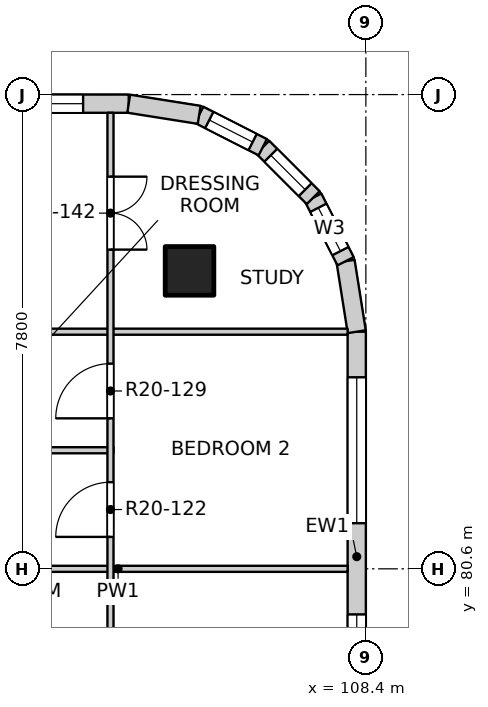
"""IFC4 building model, lengths in metres.
Left out: names, types, materials, properties, quantities, classifications, styles, units other than length and angle.
Written with IfcOpenShell. Run it as: python <this file> out.ifc"""

import sys

from ifc_helpers import new_model, si_unit, direction, frame, frame_2d, origin, origin_2d, place, context, subcontext, project, spatial, rectangle, extrude, element, fill, save


model = new_model("IFC4")
c1 = context("Model", 3, precision=1e-05, world=origin(), true_north=direction((0.0, 1.0)))
c2 = subcontext(c1, "Body", "Model", "MODEL_VIEW")
j1 = project(units=[si_unit("LENGTHUNIT", "METRE"), si_unit("PLANEANGLEUNIT", "RADIAN")], contexts=[c1])
p1 = place(None, origin())
s1 = spatial("IfcSite", under=j1, at=p1, CompositionType="ELEMENT")
p2 = place(p1, origin())
s2 = spatial("IfcBuilding", under=s1, at=p2, CompositionType="ELEMENT")
p3 = place(p2, frame((0.0, 0.0, 210.9)))
s3 = spatial("IfcBuildingStorey", under=s2, at=p3, CompositionType="ELEMENT", Elevation=210.9)
p4 = place(p3, frame((105.5, 85.5, -0.25), z_axis=(0.0, 0.0, 1.0), x_axis=(1.0, 0.0, 0.0)))
e1 = element("IfcColumn", 1, at=p4, inside=s3, PredefinedType="COLUMN", context=c2, shape_type="SweptSolid", body=[
    extrude(rectangle(XDim=0.8, YDim=0.8, at=origin_2d()), origin(), (0.0, 0.0, 1.0), 3.4),
])
p5 = place(p3, frame((108.25, 77.1, 0.0), z_axis=(0.0, 0.0, 1.0), x_axis=(0.0, 1.0, 0.0)))
e2 = element("IfcWall", 2, at=p5, inside=s3, PredefinedType="SOLIDWALL", context=c2, shape_type="SweptSolid", body=[
    extrude(rectangle(XDim=7.4, YDim=0.3, at=frame_2d((3.7, 0.0))), origin(), (0.0, 0.0, 1.0), 2.7),
])
p6 = place(p5, frame((0.35, 0.0, 0.9)))
e3 = element("IfcOpeningElement", 3, at=p6, cuts=e2, PredefinedType="OPENING", context=c2, shape_type="SweptSolid", body=[
    extrude(rectangle(XDim=2.4, YDim=1.8, at=frame_2d((1.2, 0.9))), frame((0.0, 0.16, 0.0), z_axis=(0.0, -1.0, 0.0), x_axis=(1.0, 0.0, 0.0)), (0.0, 0.0, 1.0), 0.32),
])
p7 = place(p5, frame((4.25, 0.0, 0.9)))
e4 = element("IfcOpeningElement", 4, at=p7, cuts=e2, PredefinedType="OPENING", context=c2, shape_type="SweptSolid", body=[
    extrude(rectangle(XDim=2.4, YDim=1.8, at=frame_2d((1.2, 0.9))), frame((0.0, 0.16, 0.0), z_axis=(0.0, -1.0, 0.0), x_axis=(1.0, 0.0, 0.0)), (0.0, 0.0, 1.0), 0.32),
])
p8 = place(p3, frame((97.1, 88.25, 0.0), z_axis=(0.0, 0.0, 1.0), x_axis=(1.0, 0.0, 0.0)))
e5 = element("IfcWall", 5, at=p8, inside=s3, PredefinedType="SOLIDWALL", context=c2, shape_type="SweptSolid", body=[
    extrude(rectangle(XDim=7.4, YDim=0.3, at=frame_2d((3.7, 0.0))), origin(), (0.0, 0.0, 1.0), 2.7),
])
p9 = place(p8, frame((0.35, 0.0, 0.9)))
e6 = element("IfcOpeningElement", 6, at=p9, cuts=e5, PredefinedType="OPENING", context=c2, shape_type="SweptSolid", body=[
    extrude(rectangle(XDim=2.4, YDim=1.8, at=frame_2d((1.2, 0.9))), frame((0.0, 0.16, 0.0), z_axis=(0.0, -1.0, 0.0), x_axis=(1.0, 0.0, 0.0)), (0.0, 0.0, 1.0), 0.32),
])
p10 = place(p8, frame((4.25, 0.0, 0.9)))
e7 = element("IfcOpeningElement", 7, at=p10, cuts=e5, PredefinedType="OPENING", context=c2, shape_type="SweptSolid", body=[
    extrude(rectangle(XDim=2.4, YDim=1.8, at=frame_2d((1.2, 0.9))), frame((0.0, 0.16, 0.0), z_axis=(0.0, -1.0, 0.0), x_axis=(1.0, 0.0, 0.0)), (0.0, 0.0, 1.0), 0.32),
])
p11 = place(p3, frame((108.25, 84.5, 0.0), z_axis=(0.0, 0.0, 1.0), x_axis=(-0.156496880861, 0.987678452879, 0.0)))
e8 = element("IfcWall", 8, at=p11, inside=s3, PredefinedType="SOLIDWALL", context=c2, shape_type="SweptSolid", body=[
    extrude(rectangle(XDim=1.173, YDim=0.3, at=frame_2d((0.586, 0.0))), origin(), (0.0, 0.0, 1.0), 2.7),
])
p12 = place(p3, frame((108.066, 85.659, 0.0), z_axis=(0.0, 0.0, 1.0), x_axis=(-0.454025524128, 0.890988677504, 0.0)))
e9 = element("IfcWall", 9, at=p12, inside=s3, PredefinedType="SOLIDWALL", context=c2, shape_type="SweptSolid", body=[
    extrude(rectangle(XDim=1.173, YDim=0.3, at=frame_2d((0.587, 0.0))), origin(), (0.0, 0.0, 1.0), 2.7),
])
p13 = place(p12, frame((0.187, 0.0, 0.9)))
e10 = element("IfcOpeningElement", 10, at=p13, cuts=e9, PredefinedType="OPENING", context=c2, shape_type="SweptSolid", body=[
    extrude(rectangle(XDim=0.8, YDim=1.2, at=frame_2d((0.4, 0.6))), frame((0.0, 0.16, 0.0), z_axis=(0.0, -1.0, 0.0), x_axis=(1.0, 0.0, 0.0)), (0.0, 0.0, 1.0), 0.32),
])
p14 = place(p3, frame((107.534, 86.704, 0.0), z_axis=(0.0, 0.0, 1.0), x_axis=(-0.707106781187, 0.707106781187, 0.0)))
e11 = element("IfcWall", 11, at=p14, inside=s3, PredefinedType="SOLIDWALL", context=c2, shape_type="SweptSolid", body=[
    extrude(rectangle(XDim=1.173, YDim=0.3, at=frame_2d((0.586, 0.0))), origin(), (0.0, 0.0, 1.0), 2.7),
])
p15 = place(p14, frame((0.187, 0.0, 0.9)))
e12 = element("IfcOpeningElement", 12, at=p15, cuts=e11, PredefinedType="OPENING", context=c2, shape_type="SweptSolid", body=[
    extrude(rectangle(XDim=0.8, YDim=1.2, at=frame_2d((0.4, 0.6))), frame((0.0, 0.16, 0.0), z_axis=(0.0, -1.0, 0.0), x_axis=(1.0, 0.0, 0.0)), (0.0, 0.0, 1.0), 0.32),
])
p16 = place(p3, frame((106.704, 87.534, 0.0), z_axis=(0.0, 0.0, 1.0), x_axis=(-0.890988677504, 0.454025524128, 0.0)))
e13 = element("IfcWall", 13, at=p16, inside=s3, PredefinedType="SOLIDWALL", context=c2, shape_type="SweptSolid", body=[
    extrude(rectangle(XDim=1.173, YDim=0.3, at=frame_2d((0.587, 0.0))), origin(), (0.0, 0.0, 1.0), 2.7),
])
p17 = place(p16, frame((0.187, 0.0, 0.9)))
e14 = element("IfcOpeningElement", 14, at=p17, cuts=e13, PredefinedType="OPENING", context=c2, shape_type="SweptSolid", body=[
    extrude(rectangle(XDim=0.8, YDim=1.2, at=frame_2d((0.4, 0.6))), frame((0.0, 0.16, 0.0), z_axis=(0.0, -1.0, 0.0), x_axis=(1.0, 0.0, 0.0)), (0.0, 0.0, 1.0), 0.32),
])
p18 = place(p3, frame((105.659, 88.066, 0.0), z_axis=(0.0, 0.0, 1.0), x_axis=(-0.987678452879, 0.156496880861, 0.0)))
e15 = element("IfcWall", 15, at=p18, inside=s3, PredefinedType="SOLIDWALL", context=c2, shape_type="SweptSolid", body=[
    extrude(rectangle(XDim=1.173, YDim=0.3, at=frame_2d((0.586, 0.0))), origin(), (0.0, 0.0, 1.0), 2.7),
])
p19 = place(p3, frame((100.55, 80.6, 0.0), z_axis=(0.0, 0.0, 1.0), x_axis=(1.0, 0.0, 0.0)))
e16 = element("IfcWall", 16, at=p19, inside=s3, PredefinedType="PARTITIONING", context=c2, shape_type="SweptSolid", body=[
    extrude(rectangle(XDim=7.55, YDim=0.1, at=frame_2d((3.775, 0.0))), origin(), (0.0, 0.0, 1.0), 3.15),
])
p20 = place(p3, frame((100.55, 82.55, 0.0), z_axis=(0.0, 0.0, 1.0), x_axis=(1.0, 0.0, 0.0)))
e17 = element("IfcWall", 17, at=p20, inside=s3, PredefinedType="PARTITIONING", context=c2, shape_type="SweptSolid", body=[
    extrude(rectangle(XDim=3.7, YDim=0.1, at=frame_2d((1.85, 0.0))), origin(), (0.0, 0.0, 1.0), 3.15),
])
p21 = place(p3, frame((96.6, 84.5, 0.0), z_axis=(0.0, 0.0, 1.0), x_axis=(1.0, 0.0, 0.0)))
e18 = element("IfcWall", 18, at=p21, inside=s3, PredefinedType="PARTITIONING", context=c2, shape_type="SweptSolid", body=[
    extrude(rectangle(XDim=11.5, YDim=0.1, at=frame_2d((5.75, 0.0))), origin(), (0.0, 0.0, 1.0), 3.15),
])
p22 = place(p21, frame((2.635, 0.0, 0.0)))
e19 = element("IfcOpeningElement", 19, at=p22, cuts=e18, PredefinedType="OPENING", context=c2, shape_type="SweptSolid", body=[
    extrude(rectangle(XDim=0.9, YDim=2.1, at=frame_2d((0.45, 1.05))), frame((0.0, 0.06, 0.0), z_axis=(0.0, -1.0, 0.0), x_axis=(1.0, 0.0, 0.0)), (0.0, 0.0, 1.0), 0.12),
])
p23 = place(p3, frame((104.2, 61.2, 0.0), z_axis=(0.0, 0.0, 1.0), x_axis=(0.0, 1.0, 0.0)))
e20 = element("IfcWall", 20, at=p23, inside=s3, PredefinedType="PARTITIONING", context=c2, shape_type="SweptSolid", body=[
    extrude(rectangle(XDim=26.9, YDim=0.1, at=frame_2d((13.45, 0.0))), origin(), (0.0, 0.0, 1.0), 3.15),
])
p24 = place(p23, frame((1.25, 0.0, 0.0)))
e21 = element("IfcOpeningElement", 21, at=p24, cuts=e20, PredefinedType="OPENING", context=c2, shape_type="SweptSolid", body=[
    extrude(rectangle(XDim=1.2, YDim=2.1, at=frame_2d((0.6, 1.05))), frame((0.0, 0.06, 0.0), z_axis=(0.0, -1.0, 0.0), x_axis=(1.0, 0.0, 0.0)), (0.0, 0.0, 1.0), 0.12),
])
p25 = place(p23, frame((5.15, 0.0, 0.0)))
e22 = element("IfcOpeningElement", 22, at=p25, cuts=e20, PredefinedType="OPENING", context=c2, shape_type="SweptSolid", body=[
    extrude(rectangle(XDim=1.2, YDim=2.1, at=frame_2d((0.6, 1.05))), frame((0.0, 0.06, 0.0), z_axis=(0.0, -1.0, 0.0), x_axis=(1.0, 0.0, 0.0)), (0.0, 0.0, 1.0), 0.12),
])
p26 = place(p23, frame((8.225, 0.0, 0.0)))
e23 = element("IfcOpeningElement", 23, at=p26, cuts=e20, PredefinedType="OPENING", context=c2, shape_type="SweptSolid", body=[
    extrude(rectangle(XDim=0.9, YDim=2.1, at=frame_2d((0.45, 1.05))), frame((0.0, 0.06, 0.0), z_axis=(0.0, -1.0, 0.0), x_axis=(1.0, 0.0, 0.0)), (0.0, 0.0, 1.0), 0.12),
])
p27 = place(p23, frame((10.175, 0.0, 0.0)))
e24 = element("IfcOpeningElement", 24, at=p27, cuts=e20, PredefinedType="OPENING", context=c2, shape_type="SweptSolid", body=[
    extrude(rectangle(XDim=0.9, YDim=2.1, at=frame_2d((0.45, 1.05))), frame((0.0, 0.06, 0.0), z_axis=(0.0, -1.0, 0.0), x_axis=(1.0, 0.0, 0.0)), (0.0, 0.0, 1.0), 0.12),
])
p28 = place(p23, frame((12.125, 0.0, 0.0)))
e25 = element("IfcOpeningElement", 25, at=p28, cuts=e20, PredefinedType="OPENING", context=c2, shape_type="SweptSolid", body=[
    extrude(rectangle(XDim=0.9, YDim=2.1, at=frame_2d((0.45, 1.05))), frame((0.0, 0.06, 0.0), z_axis=(0.0, -1.0, 0.0), x_axis=(1.0, 0.0, 0.0)), (0.0, 0.0, 1.0), 0.12),
])
p29 = place(p23, frame((14.075, 0.0, 0.0)))
e26 = element("IfcOpeningElement", 26, at=p29, cuts=e20, PredefinedType="OPENING", context=c2, shape_type="SweptSolid", body=[
    extrude(rectangle(XDim=0.9, YDim=2.1, at=frame_2d((0.45, 1.05))), frame((0.0, 0.06, 0.0), z_axis=(0.0, -1.0, 0.0), x_axis=(1.0, 0.0, 0.0)), (0.0, 0.0, 1.0), 0.12),
])
p30 = place(p23, frame((16.85, 0.0, 0.0)))
e27 = element("IfcOpeningElement", 27, at=p30, cuts=e20, PredefinedType="OPENING", context=c2, shape_type="SweptSolid", body=[
    extrude(rectangle(XDim=1.2, YDim=2.1, at=frame_2d((0.6, 1.05))), frame((0.0, 0.06, 0.0), z_axis=(0.0, -1.0, 0.0), x_axis=(1.0, 0.0, 0.0)), (0.0, 0.0, 1.0), 0.12),
])
p31 = place(p23, frame((19.925, 0.0, 0.0)))
e28 = element("IfcOpeningElement", 28, at=p31, cuts=e20, PredefinedType="OPENING", context=c2, shape_type="SweptSolid", body=[
    extrude(rectangle(XDim=0.9, YDim=2.1, at=frame_2d((0.45, 1.05))), frame((0.0, 0.06, 0.0), z_axis=(0.0, -1.0, 0.0), x_axis=(1.0, 0.0, 0.0)), (0.0, 0.0, 1.0), 0.12),
])
p32 = place(p23, frame((21.875, 0.0, 0.0)))
e29 = element("IfcOpeningElement", 29, at=p32, cuts=e20, PredefinedType="OPENING", context=c2, shape_type="SweptSolid", body=[
    extrude(rectangle(XDim=0.9, YDim=2.1, at=frame_2d((0.45, 1.05))), frame((0.0, 0.06, 0.0), z_axis=(0.0, -1.0, 0.0), x_axis=(1.0, 0.0, 0.0)), (0.0, 0.0, 1.0), 0.12),
])
p33 = place(p23, frame((24.65, 0.0, 0.0)))
e30 = element("IfcOpeningElement", 30, at=p33, cuts=e20, PredefinedType="OPENING", context=c2, shape_type="SweptSolid", body=[
    extrude(rectangle(XDim=1.2, YDim=2.1, at=frame_2d((0.6, 1.05))), frame((0.0, 0.06, 0.0), z_axis=(0.0, -1.0, 0.0), x_axis=(1.0, 0.0, 0.0)), (0.0, 0.0, 1.0), 0.12),
])
p34 = place(p6, origin())
e31 = element("IfcWindow", 31, at=p34, inside=s3, PartitioningType="DOUBLE_PANEL_VERTICAL", PredefinedType="WINDOW", context=c2, shape_type="SweptSolid", body=[
    extrude(rectangle(XDim=2.4, YDim=1.8, at=frame_2d((1.2, 0.9))), frame((0.0, 0.03, 0.0), z_axis=(0.0, -1.0, 0.0), x_axis=(1.0, 0.0, 0.0)), (0.0, 0.0, 1.0), 0.06),
])
fill(e3, e31)
p35 = place(p7, origin())
e32 = element("IfcWindow", 32, at=p35, inside=s3, PartitioningType="DOUBLE_PANEL_VERTICAL", PredefinedType="WINDOW", context=c2, shape_type="SweptSolid", body=[
    extrude(rectangle(XDim=2.4, YDim=1.8, at=frame_2d((1.2, 0.9))), frame((0.0, 0.03, 0.0), z_axis=(0.0, -1.0, 0.0), x_axis=(1.0, 0.0, 0.0)), (0.0, 0.0, 1.0), 0.06),
])
fill(e4, e32)
p36 = place(p10, origin())
e33 = element("IfcWindow", 33, at=p36, inside=s3, PartitioningType="DOUBLE_PANEL_VERTICAL", PredefinedType="WINDOW", context=c2, shape_type="SweptSolid", body=[
    extrude(rectangle(XDim=2.4, YDim=1.8, at=frame_2d((1.2, 0.9))), frame((0.0, 0.03, 0.0), z_axis=(0.0, -1.0, 0.0), x_axis=(1.0, 0.0, 0.0)), (0.0, 0.0, 1.0), 0.06),
])
fill(e7, e33)
p37 = place(p13, origin())
e34 = element("IfcWindow", 34, at=p37, inside=s3, PartitioningType="SINGLE_PANEL", PredefinedType="WINDOW", context=c2, shape_type="SweptSolid", body=[
    extrude(rectangle(XDim=0.8, YDim=1.2, at=frame_2d((0.4, 0.6))), frame((0.0, 0.03, 0.0), z_axis=(0.0, -1.0, 0.0), x_axis=(1.0, 0.0, 0.0)), (0.0, 0.0, 1.0), 0.06),
])
fill(e10, e34)
p38 = place(p15, origin())
e35 = element("IfcWindow", 35, at=p38, inside=s3, PartitioningType="SINGLE_PANEL", PredefinedType="WINDOW", context=c2, shape_type="SweptSolid", body=[
    extrude(rectangle(XDim=0.8, YDim=1.2, at=frame_2d((0.4, 0.6))), frame((0.0, 0.03, 0.0), z_axis=(0.0, -1.0, 0.0), x_axis=(1.0, 0.0, 0.0)), (0.0, 0.0, 1.0), 0.06),
])
fill(e12, e35)
p39 = place(p17, origin())
e36 = element("IfcWindow", 36, at=p39, inside=s3, PartitioningType="SINGLE_PANEL", PredefinedType="WINDOW", context=c2, shape_type="SweptSolid", body=[
    extrude(rectangle(XDim=0.8, YDim=1.2, at=frame_2d((0.4, 0.6))), frame((0.0, 0.03, 0.0), z_axis=(0.0, -1.0, 0.0), x_axis=(1.0, 0.0, 0.0)), (0.0, 0.0, 1.0), 0.06),
])
fill(e14, e36)
p40 = place(p31, origin())
e37 = element("IfcDoor", 37, at=p40, inside=s3, OperationType="SINGLE_SWING_LEFT", PredefinedType="DOOR", context=c2, shape_type="SweptSolid", body=[
    extrude(rectangle(XDim=0.9, YDim=2.1, at=frame_2d((0.45, 1.05))), frame((0.0, 0.025, 0.0), z_axis=(0.0, -1.0, 0.0), x_axis=(1.0, 0.0, 0.0)), (0.0, 0.0, 1.0), 0.05),
])
fill(e28, e37)
p41 = place(p32, origin())
e38 = element("IfcDoor", 38, at=p41, inside=s3, OperationType="SINGLE_SWING_LEFT", PredefinedType="DOOR", context=c2, shape_type="SweptSolid", body=[
    extrude(rectangle(XDim=0.9, YDim=2.1, at=frame_2d((0.45, 1.05))), frame((0.0, 0.025, 0.0), z_axis=(0.0, -1.0, 0.0), x_axis=(1.0, 0.0, 0.0)), (0.0, 0.0, 1.0), 0.05),
])
fill(e29, e38)
p42 = place(p33, origin())
e39 = element("IfcDoor", 39, at=p42, inside=s3, OperationType="DOUBLE_DOOR_SINGLE_SWING", PredefinedType="DOOR", context=c2, shape_type="SweptSolid", body=[
    extrude(rectangle(XDim=1.2, YDim=2.1, at=frame_2d((0.6, 1.05))), frame((0.0, 0.025, 0.0), z_axis=(0.0, -1.0, 0.0), x_axis=(1.0, 0.0, 0.0)), (0.0, 0.0, 1.0), 0.05),
])
fill(e30, e39)
save(model, sys.argv[1])
